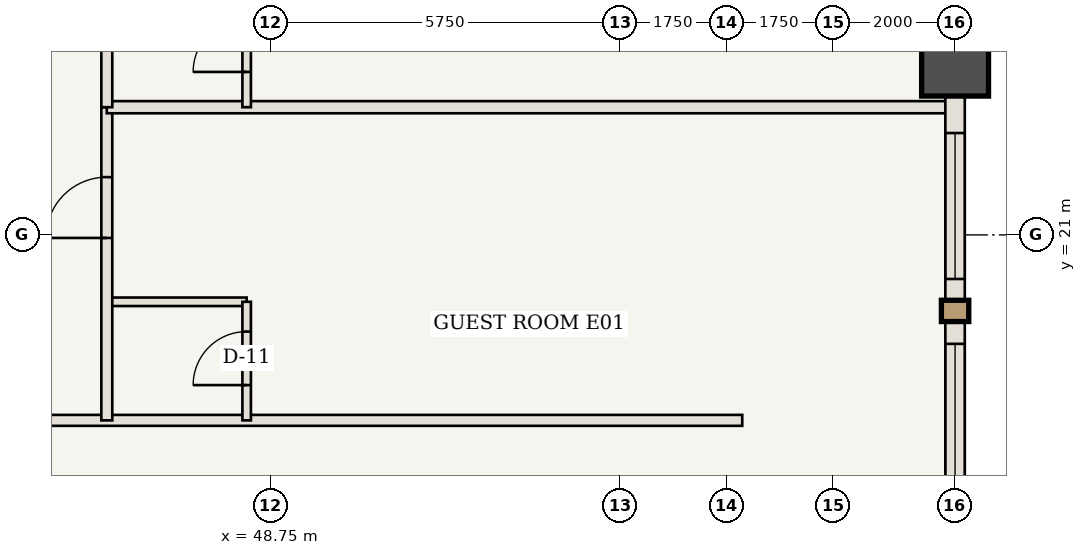
"""IFC4 building model, lengths in metres.
Left out: names, types, materials, properties, quantities, classifications, styles, units other than length and angle.
Written with IfcOpenShell. Run it as: python <this file> out.ifc"""

import sys

from ifc_helpers import new_model, si_unit, direction, frame, frame_2d, origin, origin_2d, place, context, subcontext, project, spatial, rectangle, extrude, element, fill, save


model = new_model("IFC4")
c1 = context("Model", 3, precision=1e-05, world=origin(), true_north=direction((0.0, 1.0)))
c2 = subcontext(c1, "Body", "Model", "MODEL_VIEW")
j1 = project(units=[si_unit("LENGTHUNIT", "METRE"), si_unit("PLANEANGLEUNIT", "RADIAN")], contexts=[c1])
p1 = place(None, origin())
s1 = spatial("IfcSite", under=j1, at=p1, CompositionType="ELEMENT")
p2 = place(p1, origin())
s2 = spatial("IfcBuilding", under=s1, at=p2, CompositionType="ELEMENT")
p3 = place(p2, frame((0.0, 0.0, 73.85)))
s3 = spatial("IfcBuildingStorey", under=s2, at=p3, CompositionType="ELEMENT", Elevation=73.85)
p4 = place(p3, frame((60.0, 23.833, 0.0), z_axis=(0.0, 0.0, 1.0), x_axis=(1.0, 0.0, 0.0)))
e1 = element("IfcColumn", 1, at=p4, inside=s3, PredefinedType="COLUMN", context=c2, shape_type="SweptSolid", body=[
    extrude(rectangle(XDim=1.1, YDim=1.1, at=origin_2d()), origin(), (0.0, 0.0, 1.0), 3.5),
])
p5 = place(p3, frame((36.2, 17.95, 0.0), z_axis=(0.0, 0.0, 1.0), x_axis=(1.0, 0.0, 0.0)))
e2 = element("IfcWall", 2, at=p5, inside=s3, PredefinedType="STANDARD", context=c2, shape_type="SweptSolid", body=[
    extrude(rectangle(XDim=20.3, YDim=0.18, at=frame_2d((10.15, 0.0))), origin(), (0.0, 0.0, 1.0), 3.24),
])
p6 = place(p5, frame((4.4, 0.0, 0.0)))
e3 = element("IfcOpeningElement", 3, at=p6, cuts=e2, PredefinedType="OPENING", context=c2, shape_type="SweptSolid", body=[
    extrude(rectangle(XDim=1.0, YDim=2.15, at=frame_2d((0.5, 1.075))), frame((0.0, 0.1, 0.0), z_axis=(0.0, -1.0, 0.0), x_axis=(1.0, 0.0, 0.0)), (0.0, 0.0, 1.0), 0.2),
])
p7 = place(p3, frame((46.05, 19.9, 0.0), z_axis=(0.0, 0.0, 1.0), x_axis=(1.0, 0.0, 0.0)))
e4 = element("IfcWall", 4, at=p7, inside=s3, PredefinedType="STANDARD", context=c2, shape_type="SweptSolid", body=[
    extrude(rectangle(XDim=2.3, YDim=0.14, at=frame_2d((1.15, 0.0))), origin(), (0.0, 0.0, 1.0), 3.24),
])
p8 = place(p3, frame((48.35, 17.95, 0.0), z_axis=(0.0, 0.0, 1.0), x_axis=(0.0, 1.0, 0.0)))
e5 = element("IfcWall", 5, at=p8, inside=s3, PredefinedType="STANDARD", context=c2, shape_type="SweptSolid", body=[
    extrude(rectangle(XDim=1.95, YDim=0.14, at=frame_2d((0.975, 0.0))), origin(), (0.0, 0.0, 1.0), 3.24),
])
p9 = place(p8, frame((0.58, 0.0, 0.0)))
e6 = element("IfcOpeningElement", 6, at=p9, cuts=e5, PredefinedType="OPENING", context=c2, shape_type="SweptSolid", body=[
    extrude(rectangle(XDim=0.88, YDim=2.1, at=frame_2d((0.44, 1.05))), frame((0.0, 0.08, 0.0), z_axis=(0.0, -1.0, 0.0), x_axis=(1.0, 0.0, 0.0)), (0.0, 0.0, 1.0), 0.16),
])
p10 = place(p3, frame((46.05, 17.95, 0.0), z_axis=(0.0, 0.0, 1.0), x_axis=(0.0, 1.0, 0.0)))
e7 = element("IfcWall", 7, at=p10, inside=s3, PredefinedType="STANDARD", context=c2, shape_type="SweptSolid", body=[
    extrude(rectangle(XDim=5.15, YDim=0.18, at=frame_2d((2.575, 0.0))), origin(), (0.0, 0.0, 1.0), 3.24),
])
p11 = place(p10, frame((3.0, 0.0, 0.0)))
e8 = element("IfcOpeningElement", 8, at=p11, cuts=e7, PredefinedType="OPENING", context=c2, shape_type="SweptSolid", body=[
    extrude(rectangle(XDim=1.0, YDim=2.15, at=frame_2d((0.5, 1.075))), frame((0.0, 0.1, 0.0), z_axis=(0.0, -1.0, 0.0), x_axis=(1.0, 0.0, 0.0)), (0.0, 0.0, 1.0), 0.2),
])
p12 = place(p3, frame((46.05, 23.1, 0.0), z_axis=(0.0, 0.0, 1.0), x_axis=(1.0, 0.0, 0.0)))
e9 = element("IfcWall", 9, at=p12, inside=s3, PredefinedType="STANDARD", context=c2, shape_type="SweptSolid", body=[
    extrude(rectangle(XDim=13.89, YDim=0.2, at=frame_2d((6.945, 0.0))), origin(), (0.0, 0.0, 1.0), 3.24),
])
p13 = place(p3, frame((48.35, 23.1, 0.0), z_axis=(0.0, 0.0, 1.0), x_axis=(0.0, 1.0, 0.0)))
e10 = element("IfcWall", 10, at=p13, inside=s3, PredefinedType="STANDARD", context=c2, shape_type="SweptSolid", body=[
    extrude(rectangle(XDim=1.95, YDim=0.14, at=frame_2d((0.975, 0.0))), origin(), (0.0, 0.0, 1.0), 3.24),
])
p14 = place(p13, frame((0.58, 0.0, 0.0)))
e11 = element("IfcOpeningElement", 11, at=p14, cuts=e10, PredefinedType="OPENING", context=c2, shape_type="SweptSolid", body=[
    extrude(rectangle(XDim=0.88, YDim=2.1, at=frame_2d((0.44, 1.05))), frame((0.0, 0.08, 0.0), z_axis=(0.0, -1.0, 0.0), x_axis=(1.0, 0.0, 0.0)), (0.0, 0.0, 1.0), 0.16),
])
p15 = place(p3, frame((46.05, 23.1, 0.0), z_axis=(0.0, 0.0, 1.0), x_axis=(0.0, 1.0, 0.0)))
e12 = element("IfcWall", 12, at=p15, inside=s3, PredefinedType="STANDARD", context=c2, shape_type="SweptSolid", body=[
    extrude(rectangle(XDim=4.7, YDim=0.18, at=frame_2d((2.35, 0.0))), origin(), (0.0, 0.0, 1.0), 3.24),
])
p16 = place(p15, frame((2.775, 0.0, 0.0)))
e13 = element("IfcOpeningElement", 13, at=p16, cuts=e12, PredefinedType="OPENING", context=c2, shape_type="SweptSolid", body=[
    extrude(rectangle(XDim=1.0, YDim=2.15, at=frame_2d((0.5, 1.075))), frame((0.0, 0.1, 0.0), z_axis=(0.0, -1.0, 0.0), x_axis=(1.0, 0.0, 0.0)), (0.0, 0.0, 1.0), 0.2),
])
p17 = place(p3, frame((60.0, 23.833, 0.0), z_axis=(0.0, 0.0, 1.0), x_axis=(0.0, -1.0, 0.0)))
e14 = element("IfcWall", 14, at=p17, inside=s3, PredefinedType="USERDEFINED", context=c2, shape_type="SweptSolid", body=[
    extrude(rectangle(XDim=8.167, YDim=0.32, at=frame_2d((4.083, 0.0))), origin(), (0.0, 0.0, 1.0), 2.44),
])
p18 = place(p17, frame((1.158, 0.0, 0.85)))
e15 = element("IfcOpeningElement", 15, at=p18, cuts=e14, PredefinedType="OPENING", context=c2, shape_type="SweptSolid", body=[
    extrude(rectangle(XDim=2.4, YDim=1.39, at=frame_2d((1.2, 0.695))), frame((0.0, 0.17, 0.0), z_axis=(0.0, -1.0, 0.0), x_axis=(1.0, 0.0, 0.0)), (0.0, 0.0, 1.0), 0.34),
])
p19 = place(p17, frame((4.625, 0.0, 0.85)))
e16 = element("IfcOpeningElement", 16, at=p19, cuts=e14, PredefinedType="OPENING", context=c2, shape_type="SweptSolid", body=[
    extrude(rectangle(XDim=2.8, YDim=1.39, at=frame_2d((1.4, 0.695))), frame((0.0, 0.17, 0.0), z_axis=(0.0, -1.0, 0.0), x_axis=(1.0, 0.0, 0.0)), (0.0, 0.0, 1.0), 0.34),
])
p20 = place(p3, frame((60.0, 32.0, 0.0), z_axis=(0.0, 0.0, 1.0), x_axis=(0.0, -1.0, 0.0)))
e17 = element("IfcWall", 17, at=p20, inside=s3, PredefinedType="USERDEFINED", context=c2, shape_type="SweptSolid", body=[
    extrude(rectangle(XDim=8.167, YDim=0.32, at=frame_2d((4.083, 0.0))), origin(), (0.0, 0.0, 1.0), 2.44),
])
p21 = place(p20, frame((1.05, 0.0, 0.85)))
e18 = element("IfcOpeningElement", 18, at=p21, cuts=e17, PredefinedType="OPENING", context=c2, shape_type="SweptSolid", body=[
    extrude(rectangle(XDim=2.4, YDim=1.39, at=frame_2d((1.2, 0.695))), frame((0.0, 0.17, 0.0), z_axis=(0.0, -1.0, 0.0), x_axis=(1.0, 0.0, 0.0)), (0.0, 0.0, 1.0), 0.34),
])
p22 = place(p20, frame((4.833, 0.0, 0.85)))
e19 = element("IfcOpeningElement", 19, at=p22, cuts=e17, PredefinedType="OPENING", context=c2, shape_type="SweptSolid", body=[
    extrude(rectangle(XDim=2.4, YDim=1.39, at=frame_2d((1.2, 0.695))), frame((0.0, 0.17, 0.0), z_axis=(0.0, -1.0, 0.0), x_axis=(1.0, 0.0, 0.0)), (0.0, 0.0, 1.0), 0.34),
])
p23 = place(p9, origin())
e20 = element("IfcDoor", 20, at=p23, inside=s3, OperationType="SINGLE_SWING_LEFT", PredefinedType="DOOR", context=c2, shape_type="SweptSolid", body=[
    extrude(rectangle(XDim=0.88, YDim=2.1, at=frame_2d((0.44, 1.05))), frame((0.0, 0.025, 0.0), z_axis=(0.0, -1.0, 0.0), x_axis=(1.0, 0.0, 0.0)), (0.0, 0.0, 1.0), 0.05),
])
fill(e6, e20)
p24 = place(p11, origin())
e21 = element("IfcDoor", 21, at=p24, inside=s3, OperationType="SINGLE_SWING_LEFT", PredefinedType="DOOR", context=c2, shape_type="SweptSolid", body=[
    extrude(rectangle(XDim=1.0, YDim=2.15, at=frame_2d((0.5, 1.075))), frame((0.0, 0.025, 0.0), z_axis=(0.0, -1.0, 0.0), x_axis=(1.0, 0.0, 0.0)), (0.0, 0.0, 1.0), 0.05),
])
fill(e8, e21)
p25 = place(p14, origin())
e22 = element("IfcDoor", 22, at=p25, inside=s3, OperationType="SINGLE_SWING_LEFT", PredefinedType="DOOR", context=c2, shape_type="SweptSolid", body=[
    extrude(rectangle(XDim=0.88, YDim=2.1, at=frame_2d((0.44, 1.05))), frame((0.0, 0.025, 0.0), z_axis=(0.0, -1.0, 0.0), x_axis=(1.0, 0.0, 0.0)), (0.0, 0.0, 1.0), 0.05),
])
fill(e11, e22)
p26 = place(p18, origin())
e23 = element("IfcWindow", 23, at=p26, inside=s3, PartitioningType="SINGLE_PANEL", PredefinedType="WINDOW", context=c2, shape_type="SweptSolid", body=[
    extrude(rectangle(XDim=2.4, YDim=1.39, at=frame_2d((1.2, 0.695))), frame((0.0, 0.03, 0.0), z_axis=(0.0, -1.0, 0.0), x_axis=(1.0, 0.0, 0.0)), (0.0, 0.0, 1.0), 0.06),
])
fill(e15, e23)
p27 = place(p19, origin())
e24 = element("IfcWindow", 24, at=p27, inside=s3, PartitioningType="SINGLE_PANEL", PredefinedType="WINDOW", context=c2, shape_type="SweptSolid", body=[
    extrude(rectangle(XDim=2.8, YDim=1.39, at=frame_2d((1.4, 0.695))), frame((0.0, 0.03, 0.0), z_axis=(0.0, -1.0, 0.0), x_axis=(1.0, 0.0, 0.0)), (0.0, 0.0, 1.0), 0.06),
])
fill(e16, e24)
save(model, sys.argv[1])
